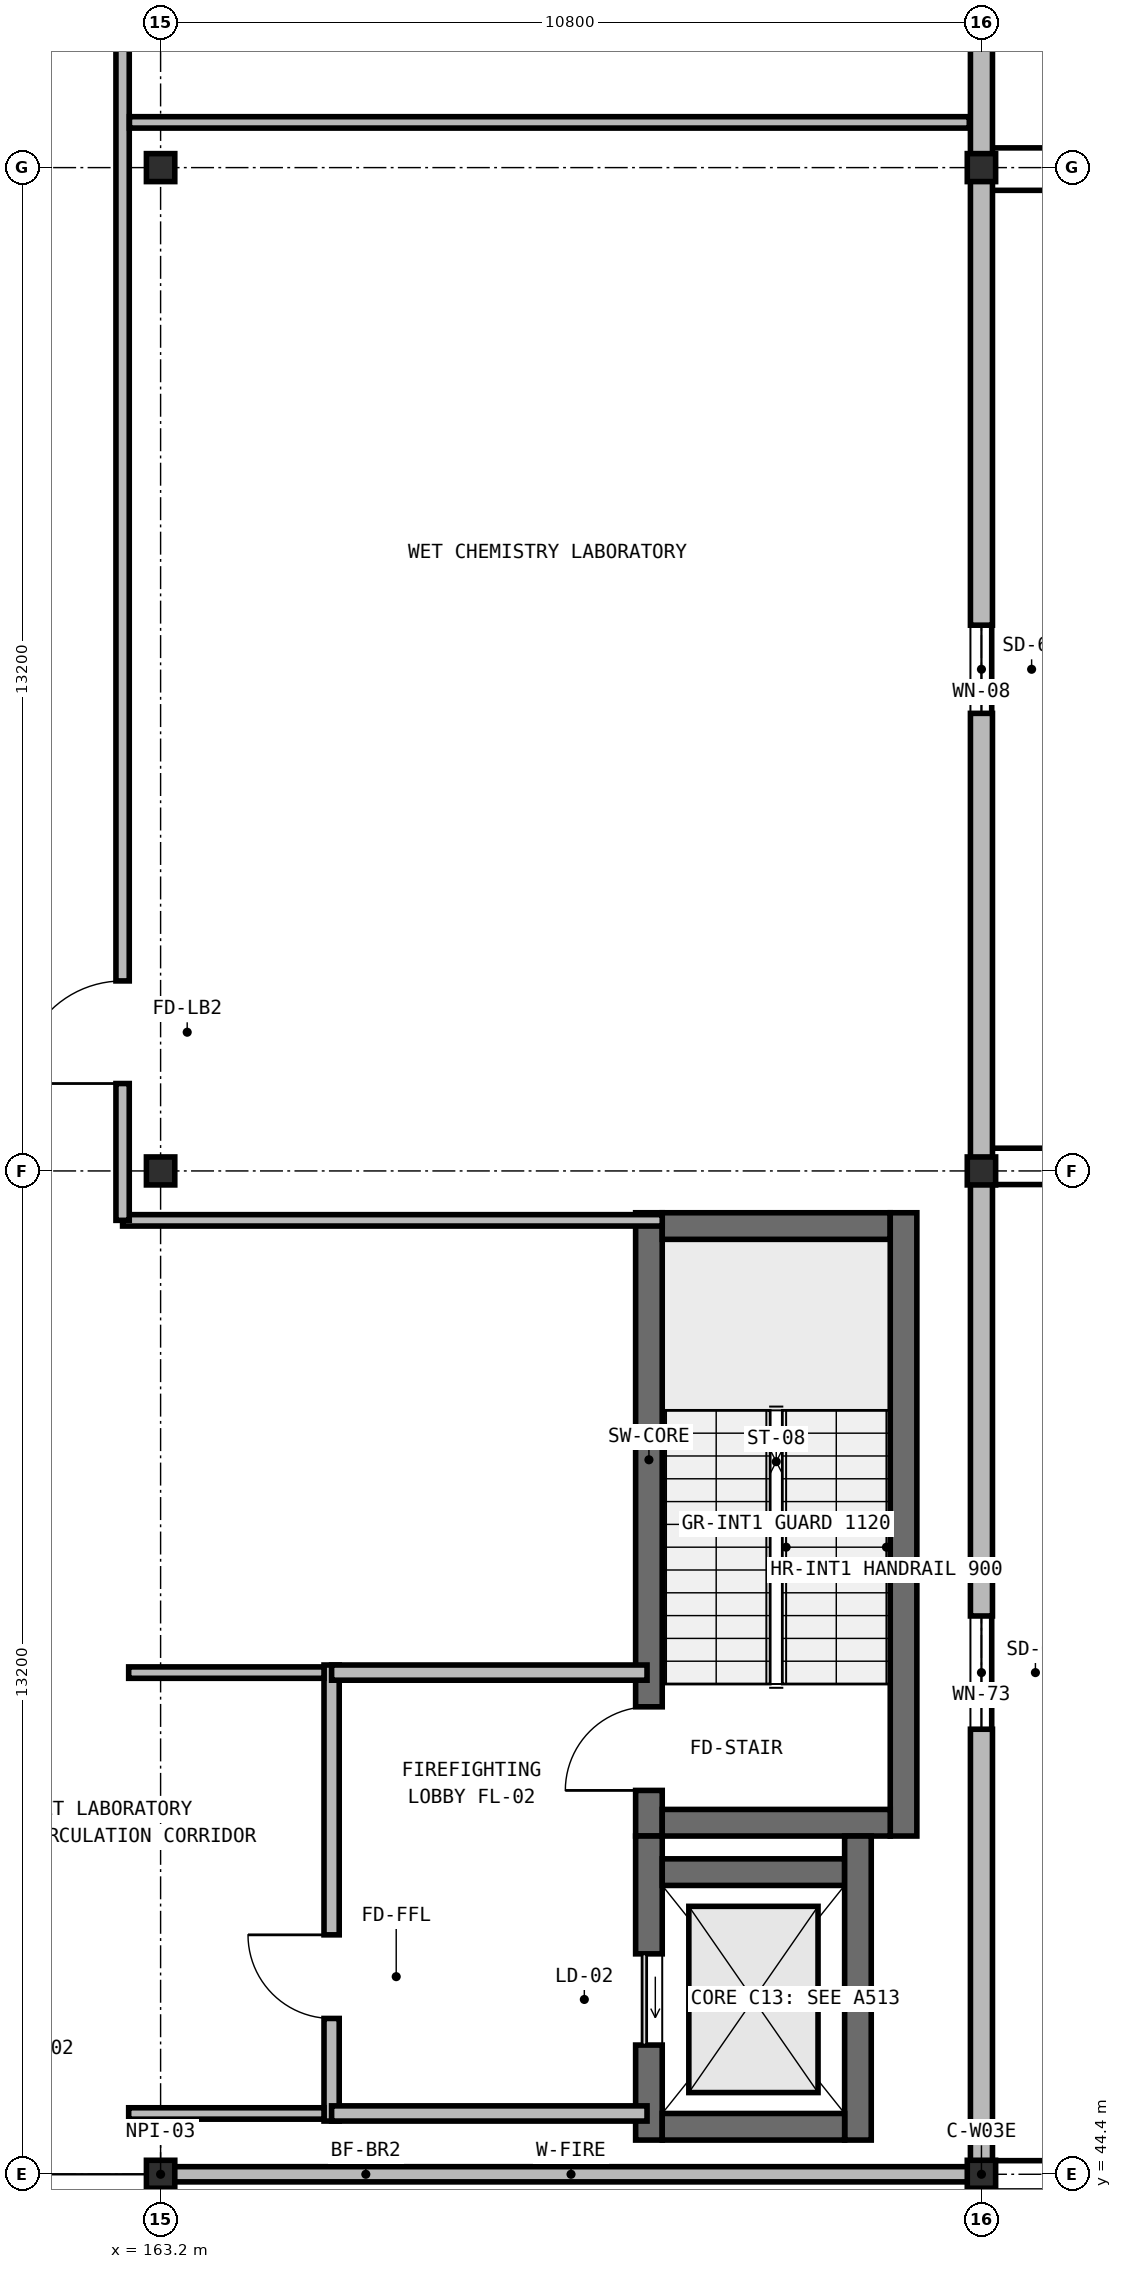
"""IFC4 building model, lengths in metres.
Left out: names, types, materials, properties, quantities, classifications, styles, units other than length and angle.
Written with IfcOpenShell. Run it as: python <this file> out.ifc"""

import sys

from ifc_helpers import new_model, si_unit, direction, frame, frame_2d, origin, origin_2d, place, context, subcontext, project, spatial, rectangle, i_section, extrude, element, fill, save


model = new_model("IFC4")
c1 = context("Model", 3, precision=1e-05, world=origin(), true_north=direction((0.0, 1.0)))
c2 = subcontext(c1, "Body", "Model", "MODEL_VIEW")
j1 = project(units=[si_unit("LENGTHUNIT", "METRE"), si_unit("PLANEANGLEUNIT", "RADIAN")], contexts=[c1])
p1 = place(None, origin())
s1 = spatial("IfcSite", under=j1, at=p1, CompositionType="ELEMENT")
p2 = place(p1, origin())
s2 = spatial("IfcBuilding", under=s1, at=p2, CompositionType="ELEMENT")
p3 = place(p2, frame((0.0, 0.0, 18.9)))
s3 = spatial("IfcBuildingStorey", under=s2, at=p3, CompositionType="ELEMENT", Elevation=18.9)
p4 = place(p3, frame((169.625, 48.85, 0.0), z_axis=(0.0, 0.0, 1.0), x_axis=(0.0, 1.0, 0.0)))
e1 = element("IfcWall", 1, at=p4, inside=s3, PredefinedType="SHEAR", context=c2, shape_type="SweptSolid", body=[
    extrude(rectangle(XDim=8.2, YDim=0.35, at=frame_2d((4.1, 0.0))), origin(), (0.0, 0.0, 1.0), 4.55),
])
p5 = place(p4, frame((0.6, 0.0, 0.0)))
e2 = element("IfcOpeningElement", 2, at=p5, cuts=e1, PredefinedType="OPENING", context=c2, shape_type="SweptSolid", body=[
    extrude(rectangle(XDim=1.1, YDim=2.15, at=frame_2d((0.55, 1.075))), frame((0.0, 0.185, 0.0), z_axis=(0.0, -1.0, 0.0), x_axis=(1.0, 0.0, 0.0)), (0.0, 0.0, 1.0), 0.37),
])
p6 = place(p3, frame((169.8, 56.875, 0.0), z_axis=(0.0, 0.0, 1.0), x_axis=(1.0, 0.0, 0.0)))
e3 = element("IfcWall", 3, at=p6, inside=s3, PredefinedType="SHEAR", context=c2, shape_type="SweptSolid", body=[
    extrude(rectangle(XDim=3.0, YDim=0.35, at=frame_2d((1.5, 0.0))), origin(), (0.0, 0.0, 1.0), 4.55),
])
p7 = place(p3, frame((172.975, 57.05, 0.0), z_axis=(0.0, 0.0, 1.0), x_axis=(0.0, -1.0, 0.0)))
e4 = element("IfcWall", 4, at=p7, inside=s3, PredefinedType="SHEAR", context=c2, shape_type="SweptSolid", body=[
    extrude(rectangle(XDim=8.2, YDim=0.35, at=frame_2d((4.1, 0.0))), origin(), (0.0, 0.0, 1.0), 4.55),
])
p8 = place(p3, frame((172.8, 49.025, 0.0), z_axis=(0.0, 0.0, 1.0), x_axis=(-1.0, 0.0, 0.0)))
e5 = element("IfcWall", 5, at=p8, inside=s3, PredefinedType="SHEAR", context=c2, shape_type="SweptSolid", body=[
    extrude(rectangle(XDim=3.0, YDim=0.35, at=frame_2d((1.5, 0.0))), origin(), (0.0, 0.0, 1.0), 4.55),
])
p9 = place(p3, frame((169.625, 44.85, 0.0), z_axis=(0.0, 0.0, 1.0), x_axis=(0.0, 1.0, 0.0)))
e6 = element("IfcWall", 6, at=p9, inside=s3, PredefinedType="SHEAR", context=c2, shape_type="SweptSolid", body=[
    extrude(rectangle(XDim=4.0, YDim=0.35, at=frame_2d((2.0, 0.0))), origin(), (0.0, 0.0, 1.0), 4.55),
])
p10 = place(p9, frame((1.25, 0.0, 0.0)))
e7 = element("IfcOpeningElement", 7, at=p10, cuts=e6, PredefinedType="OPENING", context=c2, shape_type="SweptSolid", body=[
    extrude(rectangle(XDim=1.2, YDim=2.15, at=frame_2d((0.6, 1.075))), frame((0.0, 0.185, 0.0), z_axis=(0.0, -1.0, 0.0), x_axis=(1.0, 0.0, 0.0)), (0.0, 0.0, 1.0), 0.37),
])
p11 = place(p3, frame((169.8, 48.375, 0.0), z_axis=(0.0, 0.0, 1.0), x_axis=(1.0, 0.0, 0.0)))
e8 = element("IfcWall", 8, at=p11, inside=s3, PredefinedType="SHEAR", context=c2, shape_type="SweptSolid", body=[
    extrude(rectangle(XDim=2.4, YDim=0.35, at=frame_2d((1.2, 0.0))), origin(), (0.0, 0.0, 1.0), 4.55),
])
p12 = place(p3, frame((172.375, 48.85, 0.0), z_axis=(0.0, 0.0, 1.0), x_axis=(0.0, -1.0, 0.0)))
e9 = element("IfcWall", 9, at=p12, inside=s3, PredefinedType="SHEAR", context=c2, shape_type="SweptSolid", body=[
    extrude(rectangle(XDim=4.0, YDim=0.35, at=frame_2d((2.0, 0.0))), origin(), (0.0, 0.0, 1.0), 4.55),
])
p13 = place(p3, frame((172.2, 45.025, 0.0), z_axis=(0.0, 0.0, 1.0), x_axis=(-1.0, 0.0, 0.0)))
e10 = element("IfcWall", 10, at=p13, inside=s3, PredefinedType="SHEAR", context=c2, shape_type="SweptSolid", body=[
    extrude(rectangle(XDim=2.4, YDim=0.35, at=frame_2d((1.2, 0.0))), origin(), (0.0, 0.0, 1.0), 4.55),
])
for number, where, z_axis, x_axis in (
    (11, (163.2, 44.4, 0.0), (0.0, 0.0, 1.0), (1.0, 0.0, 0.0)),
    (12, (163.2, 57.6, 0.0), (0.0, 0.0, 1.0), (1.0, 0.0, 0.0)),
    (13, (163.2, 70.8, 0.0), (0.0, 0.0, 1.0), (1.0, 0.0, 0.0)),
    (14, (174.0, 44.4, 0.0), (0.0, 0.0, 1.0), (1.0, 0.0, 0.0)),
    (15, (174.0, 57.6, 0.0), (0.0, 0.0, 1.0), (1.0, 0.0, 0.0)),
    (16, (174.0, 70.8, 0.0), (0.0, 0.0, 1.0), (1.0, 0.0, 0.0)),
):
    element("IfcColumn", number, at=place(p3, frame(where, z_axis=z_axis, x_axis=x_axis)), inside=s3, PredefinedType="COLUMN", context=c2, shape_type="SweptSolid", body=[
        extrude(i_section(OverallWidth=0.373, OverallDepth=0.368, WebThickness=0.017, FlangeThickness=0.027, at=origin_2d()), origin(), (0.0, 0.0, 1.0), 4.55),
    ])
p14 = place(p3, frame((174.0, 83.851, 0.0), z_axis=(0.0, 0.0, 1.0), x_axis=(0.0, -1.0, 0.0)))
e17 = element("IfcWall", 17, at=p14, inside=s3, PredefinedType="SOLIDWALL", context=c2, shape_type="SweptSolid", body=[
    extrude(rectangle(XDim=13.047, YDim=0.29, at=frame_2d((6.523, 0.0))), origin(), (0.0, 0.0, 1.0), 3.816),
])
p15 = place(p14, frame((5.228, 0.0, 0.95)))
e18 = element("IfcOpeningElement", 18, at=p15, cuts=e17, PredefinedType="OPENING", context=c2, shape_type="SweptSolid", body=[
    extrude(rectangle(XDim=2.59, YDim=1.64, at=frame_2d((1.295, 0.82))), frame((0.0, 0.155, 0.0), z_axis=(0.0, -1.0, 0.0), x_axis=(1.0, 0.0, 0.0)), (0.0, 0.0, 1.0), 0.31),
])
p16 = place(p3, frame((174.0, 70.796, 0.0), z_axis=(0.0, 0.0, 1.0), x_axis=(0.0, -1.0, 0.0)))
e19 = element("IfcWall", 19, at=p16, inside=s3, PredefinedType="SOLIDWALL", context=c2, shape_type="SweptSolid", body=[
    extrude(rectangle(XDim=13.192, YDim=0.29, at=frame_2d((6.596, 0.0))), origin(), (0.0, 0.0, 1.0), 3.816),
])
p17 = place(p16, frame((6.016, 0.0, 0.95)))
e20 = element("IfcOpeningElement", 20, at=p17, cuts=e19, PredefinedType="OPENING", context=c2, shape_type="SweptSolid", body=[
    extrude(rectangle(XDim=1.16, YDim=1.56, at=frame_2d((0.58, 0.78))), frame((0.0, 0.155, 0.0), z_axis=(0.0, -1.0, 0.0), x_axis=(1.0, 0.0, 0.0)), (0.0, 0.0, 1.0), 0.31),
])
p18 = place(p3, frame((174.0, 57.596, 0.0), z_axis=(0.0, 0.0, 1.0), x_axis=(0.0, -1.0, 0.0)))
e21 = element("IfcWall", 21, at=p18, inside=s3, PredefinedType="SOLIDWALL", context=c2, shape_type="SweptSolid", body=[
    extrude(rectangle(XDim=13.192, YDim=0.29, at=frame_2d((6.596, 0.0))), origin(), (0.0, 0.0, 1.0), 3.816),
])
p19 = place(p18, frame((5.851, 0.0, 0.95)))
e22 = element("IfcOpeningElement", 22, at=p19, cuts=e21, PredefinedType="OPENING", context=c2, shape_type="SweptSolid", body=[
    extrude(rectangle(XDim=1.49, YDim=1.48, at=frame_2d((0.745, 0.74))), frame((0.0, 0.155, 0.0), z_axis=(0.0, -1.0, 0.0), x_axis=(1.0, 0.0, 0.0)), (0.0, 0.0, 1.0), 0.31),
])
p20 = place(p3, frame((174.0, 44.396, 0.0), z_axis=(0.0, 0.0, 1.0), x_axis=(0.0, -1.0, 0.0)))
e23 = element("IfcWall", 23, at=p20, inside=s3, PredefinedType="SOLIDWALL", context=c2, shape_type="SweptSolid", body=[
    extrude(rectangle(XDim=9.592, YDim=0.29, at=frame_2d((4.796, 0.0))), origin(), (0.0, 0.0, 1.0), 3.884),
])
p21 = place(p20, frame((3.886, 0.0, 0.95)))
e24 = element("IfcOpeningElement", 24, at=p21, cuts=e23, PredefinedType="OPENING", context=c2, shape_type="SweptSolid", body=[
    extrude(rectangle(XDim=1.82, YDim=1.4, at=frame_2d((0.91, 0.7))), frame((0.0, 0.155, 0.0), z_axis=(0.0, -1.0, 0.0), x_axis=(1.0, 0.0, 0.0)), (0.0, 0.0, 1.0), 0.31),
])
p22 = place(p3, frame((163.36, 44.4, 0.0), z_axis=(0.0, 0.0, 1.0), x_axis=(1.0, 0.0, 0.0)))
e25 = element("IfcWall", 25, at=p22, inside=s3, PredefinedType="SOLIDWALL", context=c2, shape_type="SweptSolid", body=[
    extrude(rectangle(XDim=10.48, YDim=0.2, at=frame_2d((5.24, 0.0))), origin(), (0.0, 0.0, 1.0), 3.739),
])
p23 = place(p3, frame((165.45, 45.1, 0.0), z_axis=(0.0, 0.0, 1.0), x_axis=(0.0, 1.0, 0.0)))
e26 = element("IfcWall", 26, at=p23, inside=s3, PredefinedType="SOLIDWALL", context=c2, shape_type="SweptSolid", body=[
    extrude(rectangle(XDim=6.0, YDim=0.2, at=frame_2d((3.0, 0.0))), origin(), (0.0, 0.0, 1.0), 4.3),
])
p24 = place(p23, frame((1.35, 0.0, 0.0)))
e27 = element("IfcOpeningElement", 27, at=p24, cuts=e26, PredefinedType="OPENING", context=c2, shape_type="SweptSolid", body=[
    extrude(rectangle(XDim=1.1, YDim=2.15, at=frame_2d((0.55, 1.075))), frame((0.0, 0.11, 0.0), z_axis=(0.0, -1.0, 0.0), x_axis=(1.0, 0.0, 0.0)), (0.0, 0.0, 1.0), 0.22),
])
for number, where, z_axis, x_axis in (
    (28, (165.45, 45.2, 0.0), (0.0, 0.0, 1.0), (1.0, 0.0, 0.0)),
    (29, (165.45, 51.0, 0.0), (0.0, 0.0, 1.0), (1.0, 0.0, 0.0)),
):
    element("IfcWall", number, at=place(p3, frame(where, z_axis=z_axis, x_axis=x_axis)), inside=s3, PredefinedType="SOLIDWALL", context=c2, shape_type="SweptSolid", body=[
        extrude(rectangle(XDim=4.15, YDim=0.2, at=frame_2d((2.075, 0.0))), origin(), (0.0, 0.0, 1.0), 4.3),
    ])
p25 = place(p3, frame((162.7, 56.95, 0.0), z_axis=(0.0, 0.0, 1.0), x_axis=(1.0, 0.0, 0.0)))
e30 = element("IfcWall", 30, at=p25, inside=s3, PredefinedType="PARTITIONING", context=c2, shape_type="SweptSolid", body=[
    extrude(rectangle(XDim=7.1, YDim=0.15, at=frame_2d((3.55, 0.0))), origin(), (0.0, 0.0, 1.0), 4.3),
])
p26 = place(p3, frame((162.7, 56.95, 0.0), z_axis=(0.0, 0.0, 1.0), x_axis=(0.0, 1.0, 0.0)))
e31 = element("IfcWall", 31, at=p26, inside=s3, PredefinedType="PARTITIONING", context=c2, shape_type="SweptSolid", body=[
    extrude(rectangle(XDim=17.8, YDim=0.175, at=frame_2d((8.9, 0.0))), origin(), (0.0, 0.0, 1.0), 4.3),
])
p27 = place(p26, frame((1.8, 0.0, 0.0)))
e32 = element("IfcOpeningElement", 32, at=p27, cuts=e31, PredefinedType="OPENING", context=c2, shape_type="SweptSolid", body=[
    extrude(rectangle(XDim=1.35, YDim=2.2, at=frame_2d((0.675, 1.1))), frame((0.0, 0.097, 0.0), z_axis=(0.0, -1.0, 0.0), x_axis=(1.0, 0.0, 0.0)), (0.0, 0.0, 1.0), 0.195),
])
p28 = place(p26, frame((15.845, 0.0, 0.0)))
e33 = element("IfcOpeningElement", 33, at=p28, cuts=e31, PredefinedType="OPENING", context=c2, shape_type="SweptSolid", body=[
    extrude(rectangle(XDim=1.35, YDim=2.2, at=frame_2d((0.675, 1.1))), frame((0.0, 0.097, 0.0), z_axis=(0.0, -1.0, 0.0), x_axis=(1.0, 0.0, 0.0)), (0.0, 0.0, 1.0), 0.195),
])
p29 = place(p3, frame((162.79, 71.395, 0.0), z_axis=(0.0, 0.0, 1.0), x_axis=(1.0, 0.0, 0.0)))
e34 = element("IfcWall", 34, at=p29, inside=s3, PredefinedType="PARTITIONING", context=c2, shape_type="SweptSolid", body=[
    extrude(rectangle(XDim=11.05, YDim=0.15, at=frame_2d((5.525, 0.0))), origin(), (0.0, 0.0, 1.0), 4.3),
])
for number, where, z_axis, x_axis in (
    (35, (162.78, 45.2, 0.0), (0.0, 0.0, 1.0), (1.0, 0.0, 0.0)),
    (36, (162.78, 51.0, 0.0), (0.0, 0.0, 1.0), (1.0, 0.0, 0.0)),
):
    element("IfcWall", number, at=place(p3, frame(where, z_axis=z_axis, x_axis=x_axis)), inside=s3, PredefinedType="PARTITIONING", context=c2, shape_type="SweptSolid", body=[
        extrude(rectangle(XDim=2.57, YDim=0.15, at=frame_2d((1.285, 0.0))), origin(), (0.0, 0.0, 1.0), 4.3),
    ])
p30 = place(p17, origin())
e37 = element("IfcWindow", 37, at=p30, inside=s3, PartitioningType="SINGLE_PANEL", PredefinedType="WINDOW", context=c2, shape_type="SweptSolid", body=[
    extrude(rectangle(XDim=1.16, YDim=1.56, at=frame_2d((0.58, 0.78))), frame((0.0, 0.03, 0.0), z_axis=(0.0, -1.0, 0.0), x_axis=(1.0, 0.0, 0.0)), (0.0, 0.0, 1.0), 0.06),
])
fill(e20, e37)
p31 = place(p19, origin())
e38 = element("IfcWindow", 38, at=p31, inside=s3, PartitioningType="SINGLE_PANEL", PredefinedType="WINDOW", context=c2, shape_type="SweptSolid", body=[
    extrude(rectangle(XDim=1.49, YDim=1.48, at=frame_2d((0.745, 0.74))), frame((0.0, 0.03, 0.0), z_axis=(0.0, -1.0, 0.0), x_axis=(1.0, 0.0, 0.0)), (0.0, 0.0, 1.0), 0.06),
])
fill(e22, e38)
p32 = place(p5, origin())
e39 = element("IfcDoor", 39, at=p32, inside=s3, OperationType="SINGLE_SWING_LEFT", PredefinedType="DOOR", context=c2, shape_type="SweptSolid", body=[
    extrude(rectangle(XDim=1.1, YDim=2.15, at=frame_2d((0.55, 1.075))), frame((0.0, 0.025, 0.0), z_axis=(0.0, -1.0, 0.0), x_axis=(1.0, 0.0, 0.0)), (0.0, 0.0, 1.0), 0.05),
])
fill(e2, e39)
p33 = place(p10, origin())
e40 = element("IfcDoor", 40, at=p33, inside=s3, OperationType="SLIDING_TO_LEFT", PredefinedType="USERDEFINED", context=c2, shape_type="SweptSolid", body=[
    extrude(rectangle(XDim=1.2, YDim=2.15, at=frame_2d((0.6, 1.075))), frame((0.0, 0.025, 0.0), z_axis=(0.0, -1.0, 0.0), x_axis=(1.0, 0.0, 0.0)), (0.0, 0.0, 1.0), 0.05),
])
fill(e7, e40)
p34 = place(p24, origin())
e41 = element("IfcDoor", 41, at=p34, inside=s3, OperationType="SINGLE_SWING_RIGHT", PredefinedType="DOOR", context=c2, shape_type="SweptSolid", body=[
    extrude(rectangle(XDim=1.1, YDim=2.15, at=frame_2d((0.55, 1.075))), frame((0.0, 0.025, 0.0), z_axis=(0.0, -1.0, 0.0), x_axis=(1.0, 0.0, 0.0)), (0.0, 0.0, 1.0), 0.05),
])
fill(e27, e41)
p35 = place(p27, origin())
e42 = element("IfcDoor", 42, at=p35, inside=s3, OperationType="SINGLE_SWING_LEFT", PredefinedType="DOOR", context=c2, shape_type="SweptSolid", body=[
    extrude(rectangle(XDim=1.35, YDim=2.2, at=frame_2d((0.675, 1.1))), frame((0.0, 0.025, 0.0), z_axis=(0.0, -1.0, 0.0), x_axis=(1.0, 0.0, 0.0)), (0.0, 0.0, 1.0), 0.05),
])
fill(e32, e42)
save(model, sys.argv[1])
